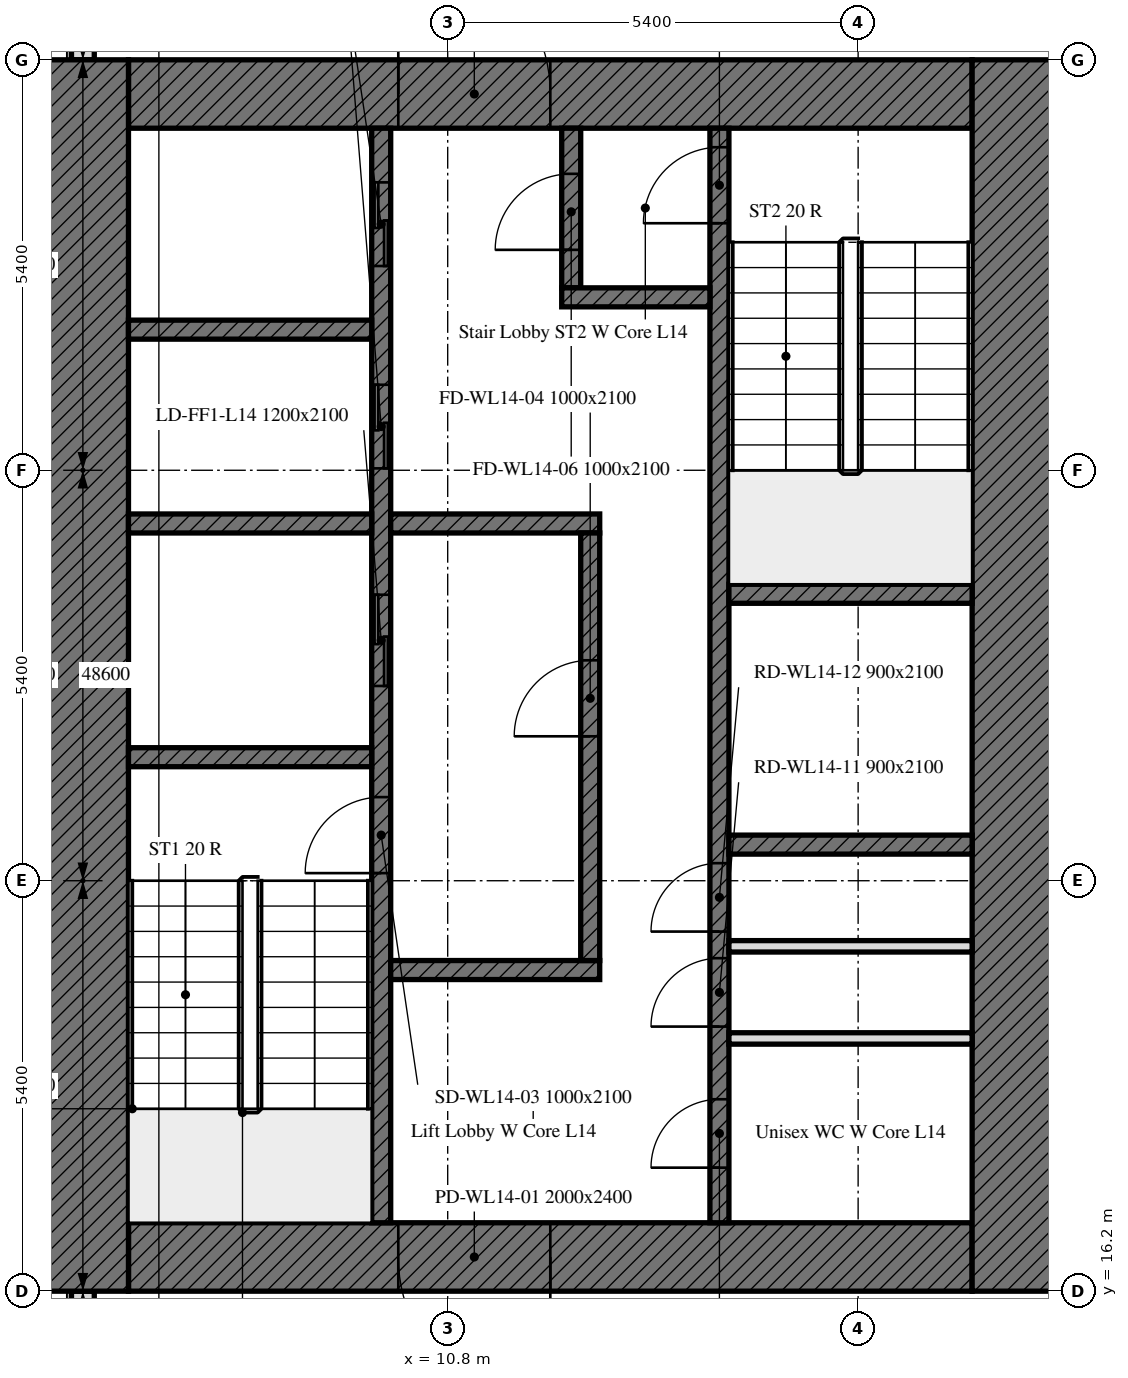
"""IFC4 building model, lengths in metres.
Left out: names, types, materials, properties, quantities, classifications, styles, units other than length and angle.
Written with IfcOpenShell. Run it as: python <this file> out.ifc"""

import sys

from ifc_helpers import new_model, si_unit, direction, frame, frame_2d, origin, place, context, subcontext, project, spatial, rectangle, extrude, element, fill, save


model = new_model("IFC4")
c1 = context("Model", 3, precision=1e-05, world=origin(), true_north=direction((0.0, 1.0)))
c2 = subcontext(c1, "Body", "Model", "MODEL_VIEW")
j1 = project(units=[si_unit("LENGTHUNIT", "METRE"), si_unit("PLANEANGLEUNIT", "RADIAN")], contexts=[c1])
p1 = place(None, origin())
s1 = spatial("IfcSite", under=j1, at=p1, CompositionType="ELEMENT")
p2 = place(p1, origin())
s2 = spatial("IfcBuilding", under=s1, at=p2, CompositionType="ELEMENT")
p3 = place(p2, frame((0.0, 0.0, 65.0)))
s3 = spatial("IfcBuildingStorey", under=s2, at=p3, CompositionType="ELEMENT", Elevation=65.0)
p4 = place(p3, frame((6.0, 43.014, 0.0), z_axis=(0.0, 0.0, 1.0), x_axis=(0.0, -1.0, 0.0)))
e1 = element("IfcWall", 1, at=p4, inside=s3, PredefinedType="SOLIDWALL", context=c2, shape_type="SweptSolid", body=[
    extrude(rectangle(XDim=10.614, YDim=0.3, at=frame_2d((5.307, 0.0))), origin(), (0.0, 0.0, 1.0), 3.5),
])
p5 = place(p4, frame((0.814, 0.0, 0.9)))
e2 = element("IfcOpeningElement", 2, at=p5, cuts=e1, PredefinedType="OPENING", context=c2, shape_type="SweptSolid", body=[
    extrude(rectangle(XDim=3.4, YDim=1.7, at=frame_2d((1.7, 0.85))), frame((0.0, 0.16, 0.0), z_axis=(0.0, -1.0, 0.0), x_axis=(1.0, 0.0, 0.0)), (0.0, 0.0, 1.0), 0.32),
])
p6 = place(p3, frame((6.0, 16.2, 0.0), z_axis=(0.0, 0.0, 1.0), x_axis=(0.0, -1.0, 0.0)))
e3 = element("IfcWall", 3, at=p6, inside=s3, PredefinedType="SOLIDWALL", context=c2, shape_type="SweptSolid", body=[
    extrude(rectangle(XDim=5.214, YDim=0.3, at=frame_2d((2.607, 0.0))), origin(), (0.0, 0.0, 1.0), 3.5),
])
p7 = place(p3, frame((17.7, 16.65, 0.0), z_axis=(0.0, 0.0, 1.0), x_axis=(-1.0, 0.0, 0.0)))
e4 = element("IfcWall", 4, at=p7, inside=s3, PredefinedType="SOLIDWALL", context=c2, shape_type="SweptSolid", body=[
    extrude(rectangle(XDim=11.1, YDim=0.9, at=frame_2d((5.55, 0.0))), origin(), (0.0, 0.0, 1.0), 3.5),
])
p8 = place(p7, frame((5.55, 0.0, 0.0)))
e5 = element("IfcOpeningElement", 5, at=p8, cuts=e4, PredefinedType="OPENING", context=c2, shape_type="SweptSolid", body=[
    extrude(rectangle(XDim=2.0, YDim=2.4, at=frame_2d((1.0, 1.2))), frame((0.0, 0.45, 0.0), z_axis=(0.0, -1.0, 0.0), x_axis=(1.0, 0.0, 0.0)), (0.0, 0.0, 1.0), 0.9),
])
p9 = place(p3, frame((6.6, 31.95, 0.0), z_axis=(0.0, 0.0, 1.0), x_axis=(1.0, 0.0, 0.0)))
e6 = element("IfcWall", 6, at=p9, inside=s3, PredefinedType="SOLIDWALL", context=c2, shape_type="SweptSolid", body=[
    extrude(rectangle(XDim=11.1, YDim=0.9, at=frame_2d((5.55, 0.0))), origin(), (0.0, 0.0, 1.0), 3.5),
])
p10 = place(p9, frame((3.55, 0.0, 0.0)))
e7 = element("IfcOpeningElement", 7, at=p10, cuts=e6, PredefinedType="OPENING", context=c2, shape_type="SweptSolid", body=[
    extrude(rectangle(XDim=2.0, YDim=2.4, at=frame_2d((1.0, 1.2))), frame((0.0, 0.45, 0.0), z_axis=(0.0, -1.0, 0.0), x_axis=(1.0, 0.0, 0.0)), (0.0, 0.0, 1.0), 0.9),
])
for number, where, z_axis, x_axis in (
    (8, (6.0, 16.2, 0.0), (0.0, 0.0, 1.0), (0.0, 1.0, 0.0)),
    (9, (18.3, 32.4, 0.0), (0.0, 0.0, 1.0), (0.0, -1.0, 0.0)),
):
    element("IfcWall", number, at=place(p3, frame(where, z_axis=z_axis, x_axis=x_axis)), inside=s3, PredefinedType="SOLIDWALL", context=c2, shape_type="SweptSolid", body=[
        extrude(rectangle(XDim=16.2, YDim=1.2, at=frame_2d((8.1, 0.0))), origin(), (0.0, 0.0, 1.0), 3.5),
    ])
p11 = place(p3, frame((9.925, 17.1, 0.0), z_axis=(0.0, 0.0, 1.0), x_axis=(0.0, 1.0, 0.0)))
e10 = element("IfcWall", 10, at=p11, inside=s3, PredefinedType="SOLIDWALL", context=c2, shape_type="SweptSolid", body=[
    extrude(rectangle(XDim=14.4, YDim=0.25, at=frame_2d((7.2, 0.0))), origin(), (0.0, 0.0, 1.0), 3.5),
])
p12 = place(p11, frame((4.6, 0.0, 0.0)))
e11 = element("IfcOpeningElement", 11, at=p12, cuts=e10, PredefinedType="OPENING", context=c2, shape_type="SweptSolid", body=[
    extrude(rectangle(XDim=1.0, YDim=2.1, at=frame_2d((0.5, 1.05))), frame((0.0, 0.125, 0.0), z_axis=(0.0, -1.0, 0.0), x_axis=(1.0, 0.0, 0.0)), (0.0, 0.0, 1.0), 0.25),
])
p13 = place(p11, frame((7.062, 0.0, 0.0)))
e12 = element("IfcOpeningElement", 12, at=p13, cuts=e10, PredefinedType="OPENING", context=c2, shape_type="SweptSolid", body=[
    extrude(rectangle(XDim=1.2, YDim=2.1, at=frame_2d((0.6, 1.05))), frame((0.0, 0.125, 0.0), z_axis=(0.0, -1.0, 0.0), x_axis=(1.0, 0.0, 0.0)), (0.0, 0.0, 1.0), 0.25),
])
p14 = place(p11, frame((9.925, 0.0, 0.0)))
e13 = element("IfcOpeningElement", 13, at=p14, cuts=e10, PredefinedType="OPENING", context=c2, shape_type="SweptSolid", body=[
    extrude(rectangle(XDim=1.1, YDim=2.1, at=frame_2d((0.55, 1.05))), frame((0.0, 0.125, 0.0), z_axis=(0.0, -1.0, 0.0), x_axis=(1.0, 0.0, 0.0)), (0.0, 0.0, 1.0), 0.25),
])
p15 = place(p11, frame((12.587, 0.0, 0.0)))
e14 = element("IfcOpeningElement", 14, at=p15, cuts=e10, PredefinedType="OPENING", context=c2, shape_type="SweptSolid", body=[
    extrude(rectangle(XDim=1.1, YDim=2.1, at=frame_2d((0.55, 1.05))), frame((0.0, 0.125, 0.0), z_axis=(0.0, -1.0, 0.0), x_axis=(1.0, 0.0, 0.0)), (0.0, 0.0, 1.0), 0.25),
])
p16 = place(p3, frame((14.375, 17.1, 0.0), z_axis=(0.0, 0.0, 1.0), x_axis=(0.0, 1.0, 0.0)))
e15 = element("IfcWall", 15, at=p16, inside=s3, PredefinedType="SOLIDWALL", context=c2, shape_type="SweptSolid", body=[
    extrude(rectangle(XDim=14.4, YDim=0.25, at=frame_2d((7.2, 0.0))), origin(), (0.0, 0.0, 1.0), 3.5),
])
p17 = place(p16, frame((13.15, 0.0, 0.0)))
e16 = element("IfcOpeningElement", 16, at=p17, cuts=e15, PredefinedType="OPENING", context=c2, shape_type="SweptSolid", body=[
    extrude(rectangle(XDim=1.0, YDim=2.1, at=frame_2d((0.5, 1.05))), frame((0.0, 0.125, 0.0), z_axis=(0.0, -1.0, 0.0), x_axis=(1.0, 0.0, 0.0)), (0.0, 0.0, 1.0), 0.25),
])
p18 = place(p16, frame((0.725, 0.0, 0.0)))
e17 = element("IfcOpeningElement", 17, at=p18, cuts=e15, PredefinedType="OPENING", context=c2, shape_type="SweptSolid", body=[
    extrude(rectangle(XDim=0.9, YDim=2.1, at=frame_2d((0.45, 1.05))), frame((0.0, 0.125, 0.0), z_axis=(0.0, -1.0, 0.0), x_axis=(1.0, 0.0, 0.0)), (0.0, 0.0, 1.0), 0.25),
])
p19 = place(p16, frame((2.581, 0.0, 0.0)))
e18 = element("IfcOpeningElement", 18, at=p19, cuts=e15, PredefinedType="OPENING", context=c2, shape_type="SweptSolid", body=[
    extrude(rectangle(XDim=0.9, YDim=2.1, at=frame_2d((0.45, 1.05))), frame((0.0, 0.125, 0.0), z_axis=(0.0, -1.0, 0.0), x_axis=(1.0, 0.0, 0.0)), (0.0, 0.0, 1.0), 0.25),
])
p20 = place(p16, frame((3.831, 0.0, 0.0)))
e19 = element("IfcOpeningElement", 19, at=p20, cuts=e15, PredefinedType="OPENING", context=c2, shape_type="SweptSolid", body=[
    extrude(rectangle(XDim=0.9, YDim=2.1, at=frame_2d((0.45, 1.05))), frame((0.0, 0.125, 0.0), z_axis=(0.0, -1.0, 0.0), x_axis=(1.0, 0.0, 0.0)), (0.0, 0.0, 1.0), 0.25),
])
for number, where, z_axis, x_axis in (
    (20, (6.6, 23.225, 0.0), (0.0, 0.0, 1.0), (1.0, 0.0, 0.0)),
    (21, (14.5, 25.375, 0.0), (0.0, 0.0, 1.0), (1.0, 0.0, 0.0)),
    (22, (14.5, 22.075, 0.0), (0.0, 0.0, 1.0), (1.0, 0.0, 0.0)),
    (23, (6.6, 26.3, 0.0), (0.0, 0.0, 1.0), (1.0, 0.0, 0.0)),
):
    element("IfcWall", number, at=place(p3, frame(where, z_axis=z_axis, x_axis=x_axis)), inside=s3, PredefinedType="SOLIDWALL", context=c2, shape_type="SweptSolid", body=[
        extrude(rectangle(XDim=3.2, YDim=0.25, at=frame_2d((1.6, 0.0))), origin(), (0.0, 0.0, 1.0), 3.5),
    ])
for number, where, z_axis, x_axis in (
    (24, (10.05, 26.3, 0.0), (0.0, 0.0, 1.0), (1.0, 0.0, 0.0)),
    (25, (10.05, 20.425, 0.0), (0.0, 0.0, 1.0), (1.0, 0.0, 0.0)),
):
    element("IfcWall", number, at=place(p3, frame(where, z_axis=z_axis, x_axis=x_axis)), inside=s3, PredefinedType="SOLIDWALL", context=c2, shape_type="SweptSolid", body=[
        extrude(rectangle(XDim=2.75, YDim=0.25, at=frame_2d((1.375, 0.0))), origin(), (0.0, 0.0, 1.0), 3.5),
    ])
p21 = place(p3, frame((12.425, 29.4, 0.0), z_axis=(0.0, 0.0, 1.0), x_axis=(0.0, 1.0, 0.0)))
e26 = element("IfcWall", 26, at=p21, inside=s3, PredefinedType="SOLIDWALL", context=c2, shape_type="SweptSolid", body=[
    extrude(rectangle(XDim=2.1, YDim=0.25, at=frame_2d((1.05, 0.0))), origin(), (0.0, 0.0, 1.0), 3.5),
])
p22 = place(p21, frame((0.5, 0.0, 0.0)))
e27 = element("IfcOpeningElement", 27, at=p22, cuts=e26, PredefinedType="OPENING", context=c2, shape_type="SweptSolid", body=[
    extrude(rectangle(XDim=1.0, YDim=2.1, at=frame_2d((0.5, 1.05))), frame((0.0, 0.125, 0.0), z_axis=(0.0, -1.0, 0.0), x_axis=(1.0, 0.0, 0.0)), (0.0, 0.0, 1.0), 0.25),
])
p23 = place(p3, frame((12.3, 29.275, 0.0), z_axis=(0.0, 0.0, 1.0), x_axis=(1.0, 0.0, 0.0)))
e28 = element("IfcWall", 28, at=p23, inside=s3, PredefinedType="SOLIDWALL", context=c2, shape_type="SweptSolid", body=[
    extrude(rectangle(XDim=1.95, YDim=0.25, at=frame_2d((0.975, 0.0))), origin(), (0.0, 0.0, 1.0), 3.5),
])
p24 = place(p3, frame((12.675, 20.55, 0.0), z_axis=(0.0, 0.0, 1.0), x_axis=(0.0, 1.0, 0.0)))
e29 = element("IfcWall", 29, at=p24, inside=s3, PredefinedType="SOLIDWALL", context=c2, shape_type="SweptSolid", body=[
    extrude(rectangle(XDim=5.625, YDim=0.25, at=frame_2d((2.812, 0.0))), origin(), (0.0, 0.0, 1.0), 3.5),
])
p25 = place(p24, frame((2.95, 0.0, 0.0)))
e30 = element("IfcOpeningElement", 30, at=p25, cuts=e29, PredefinedType="OPENING", context=c2, shape_type="SweptSolid", body=[
    extrude(rectangle(XDim=1.0, YDim=2.1, at=frame_2d((0.5, 1.05))), frame((0.0, 0.125, 0.0), z_axis=(0.0, -1.0, 0.0), x_axis=(1.0, 0.0, 0.0)), (0.0, 0.0, 1.0), 0.25),
])
p26 = place(p3, frame((6.6, 28.85, 0.0), z_axis=(0.0, 0.0, 1.0), x_axis=(1.0, 0.0, 0.0)))
e31 = element("IfcWall", 31, at=p26, inside=s3, PredefinedType="SOLIDWALL", context=c2, shape_type="SweptSolid", body=[
    extrude(rectangle(XDim=3.2, YDim=0.25, at=frame_2d((1.6, 0.0))), origin(), (0.0, 0.0, 1.0), 3.5),
])
for number, where, z_axis, x_axis in (
    (32, (14.5, 19.525, 0.0), (0.0, 0.0, 1.0), (1.0, 0.0, 0.0)),
    (33, (14.5, 20.737, 0.0), (0.0, 0.0, 1.0), (1.0, 0.0, 0.0)),
):
    element("IfcWall", number, at=place(p3, frame(where, z_axis=z_axis, x_axis=x_axis)), inside=s3, PredefinedType="PARTITIONING", context=c2, shape_type="SweptSolid", body=[
        extrude(rectangle(XDim=3.2, YDim=0.15, at=frame_2d((1.6, 0.0))), origin(), (0.0, 0.0, 1.0), 3.5),
    ])
p27 = place(p8, origin())
e34 = element("IfcDoor", 34, at=p27, inside=s3, OperationType="DOUBLE_DOOR_SINGLE_SWING", PredefinedType="DOOR", context=c2, shape_type="SweptSolid", body=[
    extrude(rectangle(XDim=2.0, YDim=2.4, at=frame_2d((1.0, 1.2))), frame((0.0, 0.025, 0.0), z_axis=(0.0, -1.0, 0.0), x_axis=(1.0, 0.0, 0.0)), (0.0, 0.0, 1.0), 0.05),
])
fill(e5, e34)
p28 = place(p10, origin())
e35 = element("IfcDoor", 35, at=p28, inside=s3, OperationType="DOUBLE_DOOR_SINGLE_SWING", PredefinedType="DOOR", context=c2, shape_type="SweptSolid", body=[
    extrude(rectangle(XDim=2.0, YDim=2.4, at=frame_2d((1.0, 1.2))), frame((0.0, 0.025, 0.0), z_axis=(0.0, -1.0, 0.0), x_axis=(1.0, 0.0, 0.0)), (0.0, 0.0, 1.0), 0.05),
])
fill(e7, e35)
p29 = place(p12, origin())
e36 = element("IfcDoor", 36, at=p29, inside=s3, OperationType="SINGLE_SWING_LEFT", PredefinedType="DOOR", context=c2, shape_type="SweptSolid", body=[
    extrude(rectangle(XDim=1.0, YDim=2.1, at=frame_2d((0.5, 1.05))), frame((0.0, 0.025, 0.0), z_axis=(0.0, -1.0, 0.0), x_axis=(1.0, 0.0, 0.0)), (0.0, 0.0, 1.0), 0.05),
])
fill(e11, e36)
p30 = place(p25, origin())
e37 = element("IfcDoor", 37, at=p30, inside=s3, OperationType="SINGLE_SWING_LEFT", PredefinedType="DOOR", context=c2, shape_type="SweptSolid", body=[
    extrude(rectangle(XDim=1.0, YDim=2.1, at=frame_2d((0.5, 1.05))), frame((0.0, 0.025, 0.0), z_axis=(0.0, -1.0, 0.0), x_axis=(1.0, 0.0, 0.0)), (0.0, 0.0, 1.0), 0.05),
])
fill(e30, e37)
p31 = place(p17, origin())
e38 = element("IfcDoor", 38, at=p31, inside=s3, OperationType="SINGLE_SWING_LEFT", PredefinedType="DOOR", context=c2, shape_type="SweptSolid", body=[
    extrude(rectangle(XDim=1.0, YDim=2.1, at=frame_2d((0.5, 1.05))), frame((0.0, 0.025, 0.0), z_axis=(0.0, -1.0, 0.0), x_axis=(1.0, 0.0, 0.0)), (0.0, 0.0, 1.0), 0.05),
])
fill(e16, e38)
p32 = place(p22, origin())
e39 = element("IfcDoor", 39, at=p32, inside=s3, OperationType="SINGLE_SWING_LEFT", PredefinedType="DOOR", context=c2, shape_type="SweptSolid", body=[
    extrude(rectangle(XDim=1.0, YDim=2.1, at=frame_2d((0.5, 1.05))), frame((0.0, 0.025, 0.0), z_axis=(0.0, -1.0, 0.0), x_axis=(1.0, 0.0, 0.0)), (0.0, 0.0, 1.0), 0.05),
])
fill(e27, e39)
p33 = place(p13, origin())
e40 = element("IfcDoor", 40, at=p33, inside=s3, OperationType="DOUBLE_DOOR_SLIDING", PredefinedType="DOOR", context=c2, shape_type="SweptSolid", body=[
    extrude(rectangle(XDim=1.2, YDim=2.1, at=frame_2d((0.6, 1.05))), frame((0.0, 0.025, 0.0), z_axis=(0.0, -1.0, 0.0), x_axis=(1.0, 0.0, 0.0)), (0.0, 0.0, 1.0), 0.05),
])
fill(e12, e40)
p34 = place(p14, origin())
e41 = element("IfcDoor", 41, at=p34, inside=s3, OperationType="DOUBLE_DOOR_SLIDING", PredefinedType="DOOR", context=c2, shape_type="SweptSolid", body=[
    extrude(rectangle(XDim=1.1, YDim=2.1, at=frame_2d((0.55, 1.05))), frame((0.0, 0.025, 0.0), z_axis=(0.0, -1.0, 0.0), x_axis=(1.0, 0.0, 0.0)), (0.0, 0.0, 1.0), 0.05),
])
fill(e13, e41)
p35 = place(p15, origin())
e42 = element("IfcDoor", 42, at=p35, inside=s3, OperationType="DOUBLE_DOOR_SLIDING", PredefinedType="DOOR", context=c2, shape_type="SweptSolid", body=[
    extrude(rectangle(XDim=1.1, YDim=2.1, at=frame_2d((0.55, 1.05))), frame((0.0, 0.025, 0.0), z_axis=(0.0, -1.0, 0.0), x_axis=(1.0, 0.0, 0.0)), (0.0, 0.0, 1.0), 0.05),
])
fill(e14, e42)
p36 = place(p18, origin())
e43 = element("IfcDoor", 43, at=p36, inside=s3, OperationType="SINGLE_SWING_LEFT", PredefinedType="DOOR", context=c2, shape_type="SweptSolid", body=[
    extrude(rectangle(XDim=0.9, YDim=2.1, at=frame_2d((0.45, 1.05))), frame((0.0, 0.025, 0.0), z_axis=(0.0, -1.0, 0.0), x_axis=(1.0, 0.0, 0.0)), (0.0, 0.0, 1.0), 0.05),
])
fill(e17, e43)
p37 = place(p19, origin())
e44 = element("IfcDoor", 44, at=p37, inside=s3, OperationType="SINGLE_SWING_LEFT", PredefinedType="DOOR", context=c2, shape_type="SweptSolid", body=[
    extrude(rectangle(XDim=0.9, YDim=2.1, at=frame_2d((0.45, 1.05))), frame((0.0, 0.025, 0.0), z_axis=(0.0, -1.0, 0.0), x_axis=(1.0, 0.0, 0.0)), (0.0, 0.0, 1.0), 0.05),
])
fill(e18, e44)
p38 = place(p20, origin())
e45 = element("IfcDoor", 45, at=p38, inside=s3, OperationType="SINGLE_SWING_LEFT", PredefinedType="DOOR", context=c2, shape_type="SweptSolid", body=[
    extrude(rectangle(XDim=0.9, YDim=2.1, at=frame_2d((0.45, 1.05))), frame((0.0, 0.025, 0.0), z_axis=(0.0, -1.0, 0.0), x_axis=(1.0, 0.0, 0.0)), (0.0, 0.0, 1.0), 0.05),
])
fill(e19, e45)
save(model, sys.argv[1])
